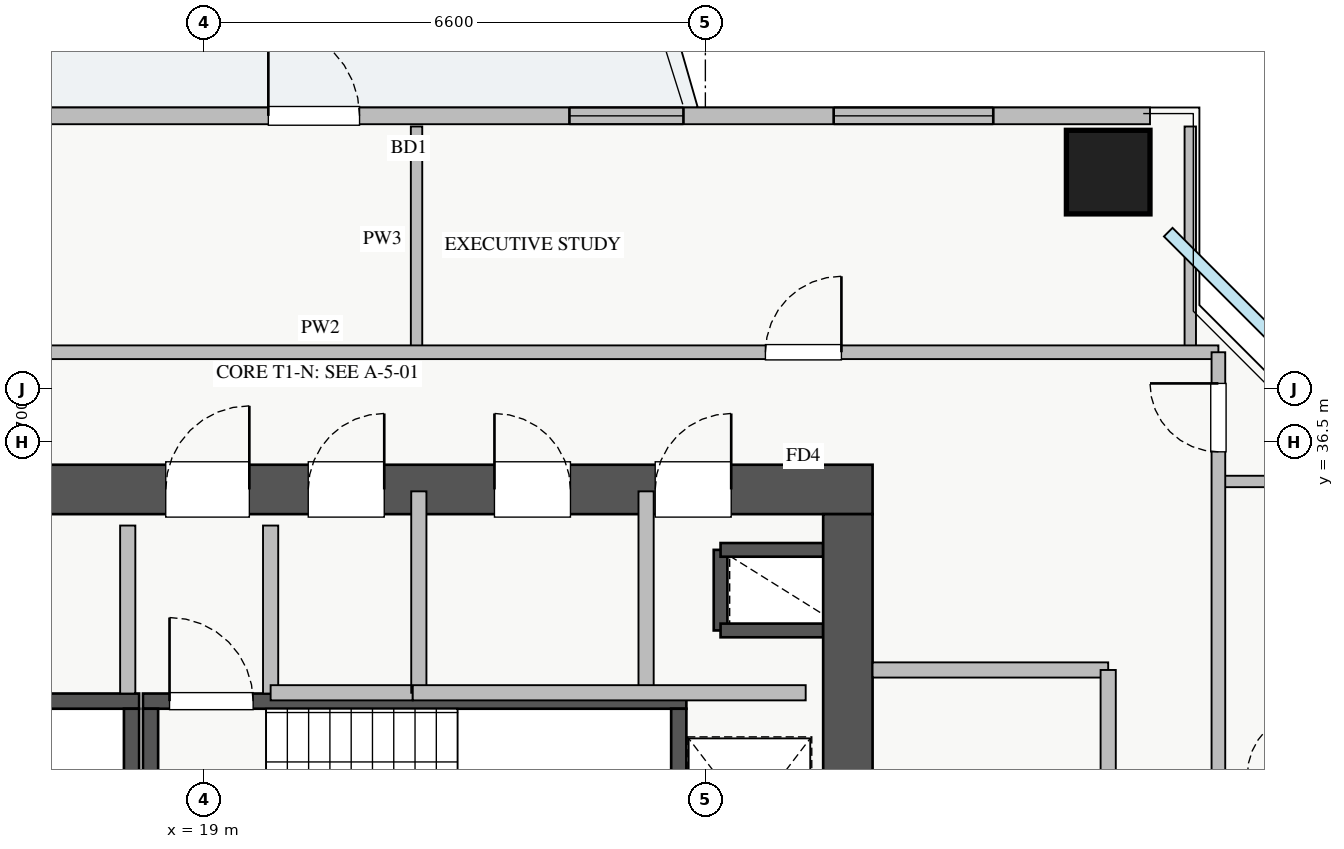
"""IFC4 building model, lengths in metres.
Left out: names, types, materials, properties, quantities, classifications, styles, units other than length and angle.
Written with IfcOpenShell. Run it as: python <this file> out.ifc"""

import sys

from ifc_helpers import new_model, si_unit, direction, frame, frame_2d, origin, origin_2d, place, context, subcontext, project, spatial, rectangle, extrude, source, transform, mapped, element, fill, save


model = new_model("IFC4")
c1 = context("Model", 3, precision=1e-05, world=origin(), true_north=direction((0.0, 1.0)))
c2 = subcontext(c1, "Body", "Model", "MODEL_VIEW")
j1 = project(units=[si_unit("LENGTHUNIT", "METRE"), si_unit("PLANEANGLEUNIT", "RADIAN")], contexts=[c1])
p1 = place(None, origin())
s1 = spatial("IfcSite", under=j1, at=p1, CompositionType="ELEMENT")
p2 = place(p1, origin())
s2 = spatial("IfcBuilding", under=s1, at=p2, CompositionType="ELEMENT")
p3 = place(p2, frame((0.0, 0.0, 126.25)))
s3 = spatial("IfcBuildingStorey", under=s2, at=p3, CompositionType="ELEMENT", Elevation=126.25)
p4 = place(p3, frame((25.8, 34.02, 0.0), z_axis=(0.0, 0.0, 1.0), x_axis=(0.0, 1.0, 0.0)))
e1 = element("IfcWall", 1, at=p4, inside=s3, PredefinedType="SHEAR", context=c2, shape_type="SweptSolid", body=[
    extrude(rectangle(XDim=1.06, YDim=0.18, at=frame_2d((0.53, 0.0))), origin(), (0.0, 0.0, 1.0), 3.07),
])
for number, where, z_axis, x_axis in (
    (2, (25.8, 35.08, 0.0), (0.0, 0.0, 1.0), (1.0, 0.0, 0.0)),
    (3, (25.8, 34.02, 0.0), (0.0, 0.0, 1.0), (1.0, 0.0, 0.0)),
):
    element("IfcWall", number, at=place(p3, frame(where, z_axis=z_axis, x_axis=x_axis)), inside=s3, PredefinedType="SHEAR", context=c2, shape_type="SweptSolid", body=[
        extrude(rectangle(XDim=1.35, YDim=0.18, at=frame_2d((0.675, 0.0))), origin(), (0.0, 0.0, 1.0), 3.07),
    ])
p5 = place(p3, frame((10.85, 33.09, 0.0), z_axis=(0.0, 0.0, 1.0), x_axis=(1.0, 0.0, 0.0)))
e4 = element("IfcWall", 4, at=p5, inside=s3, PredefinedType="SHEAR", context=c2, shape_type="SweptSolid", body=[
    extrude(rectangle(XDim=7.3, YDim=0.2, at=frame_2d((3.65, 0.0))), origin(), (0.0, 0.0, 1.0), 3.25),
])
p6 = place(p5, frame((0.35, 0.0, 0.0)))
e5 = element("IfcOpeningElement", 5, at=p6, cuts=e4, PredefinedType="OPENING", context=c2, shape_type="SweptSolid", body=[
    extrude(rectangle(XDim=1.1, YDim=2.05, at=frame_2d((0.55, 1.025))), frame((0.0, 0.11, 0.0), z_axis=(0.0, -1.0, 0.0), x_axis=(1.0, 0.0, 0.0)), (0.0, 0.0, 1.0), 0.22),
])
p7 = place(p3, frame((18.05, 30.05, 0.0), z_axis=(0.0, 0.0, 1.0), x_axis=(0.0, 1.0, 0.0)))
e6 = element("IfcWall", 6, at=p7, inside=s3, PredefinedType="SHEAR", context=c2, shape_type="SweptSolid", body=[
    extrude(rectangle(XDim=2.94, YDim=0.2, at=frame_2d((1.47, 0.0))), origin(), (0.0, 0.0, 1.0), 3.25),
])
p8 = place(p3, frame((18.2, 33.09, 0.0), z_axis=(0.0, 0.0, 1.0), x_axis=(1.0, 0.0, 0.0)))
e7 = element("IfcWall", 7, at=p8, inside=s3, PredefinedType="SHEAR", context=c2, shape_type="SweptSolid", body=[
    extrude(rectangle(XDim=7.15, YDim=0.2, at=frame_2d((3.575, 0.0))), origin(), (0.0, 0.0, 1.0), 3.25),
])
p9 = place(p8, frame((0.35, 0.0, 0.0)))
e8 = element("IfcOpeningElement", 8, at=p9, cuts=e7, PredefinedType="OPENING", context=c2, shape_type="SweptSolid", body=[
    extrude(rectangle(XDim=1.1, YDim=2.05, at=frame_2d((0.55, 1.025))), frame((0.0, 0.11, 0.0), z_axis=(0.0, -1.0, 0.0), x_axis=(1.0, 0.0, 0.0)), (0.0, 0.0, 1.0), 0.22),
])
for number, where, z_axis, x_axis in (
    (9, (18.3, 30.05, 0.0), (0.0, 0.0, 1.0), (0.0, 1.0, 0.0)),
    (10, (25.25, 30.05, 0.0), (0.0, 0.0, 1.0), (0.0, 1.0, 0.0)),
):
    element("IfcWall", number, at=place(p3, frame(where, z_axis=z_axis, x_axis=x_axis)), inside=s3, PredefinedType="SHEAR", context=c2, shape_type="SweptSolid", body=[
        extrude(rectangle(XDim=2.94, YDim=0.2, at=frame_2d((1.47, 0.0))), origin(), (0.0, 0.0, 1.0), 3.25),
    ])
p10 = place(p3, frame((10.2, 35.875, 0.0), z_axis=(0.0, 0.0, 1.0), x_axis=(1.0, 0.0, 0.0)))
e11 = element("IfcWall", 11, at=p10, inside=s3, PredefinedType="SHEAR", context=c2, shape_type="SweptSolid", body=[
    extrude(rectangle(XDim=17.6, YDim=0.65, at=frame_2d((8.8, 0.0))), origin(), (0.0, 0.0, 1.0), 3.25),
])
p11 = place(p10, frame((1.15, 0.0, 0.0)))
e12 = element("IfcOpeningElement", 12, at=p11, cuts=e11, PredefinedType="OPENING", context=c2, shape_type="SweptSolid", body=[
    extrude(rectangle(XDim=1.1, YDim=2.05, at=frame_2d((0.55, 1.025))), frame((0.0, 0.335, 0.0), z_axis=(0.0, -1.0, 0.0), x_axis=(1.0, 0.0, 0.0)), (0.0, 0.0, 1.0), 0.67),
])
p12 = place(p10, frame((8.3, 0.0, 0.0)))
e13 = element("IfcOpeningElement", 13, at=p12, cuts=e11, PredefinedType="OPENING", context=c2, shape_type="SweptSolid", body=[
    extrude(rectangle(XDim=1.1, YDim=2.05, at=frame_2d((0.55, 1.025))), frame((0.0, 0.335, 0.0), z_axis=(0.0, -1.0, 0.0), x_axis=(1.0, 0.0, 0.0)), (0.0, 0.0, 1.0), 0.67),
])
p13 = place(p10, frame((4.9, 0.0, 0.0)))
e14 = element("IfcOpeningElement", 14, at=p13, cuts=e11, PredefinedType="OPENING", context=c2, shape_type="SweptSolid", body=[
    extrude(rectangle(XDim=1.1, YDim=2.05, at=frame_2d((0.55, 1.025))), frame((0.0, 0.335, 0.0), z_axis=(0.0, -1.0, 0.0), x_axis=(1.0, 0.0, 0.0)), (0.0, 0.0, 1.0), 0.67),
])
p14 = place(p10, frame((14.74, 0.0, 0.0)))
e15 = element("IfcOpeningElement", 15, at=p14, cuts=e11, PredefinedType="OPENING", context=c2, shape_type="SweptSolid", body=[
    extrude(rectangle(XDim=1.0, YDim=2.05, at=frame_2d((0.5, 1.025))), frame((0.0, 0.335, 0.0), z_axis=(0.0, -1.0, 0.0), x_axis=(1.0, 0.0, 0.0)), (0.0, 0.0, 1.0), 0.67),
])
p15 = place(p10, frame((10.175, 0.0, 0.0)))
e16 = element("IfcOpeningElement", 16, at=p15, cuts=e11, PredefinedType="OPENING", context=c2, shape_type="SweptSolid", body=[
    extrude(rectangle(XDim=1.0, YDim=2.05, at=frame_2d((0.5, 1.025))), frame((0.0, 0.335, 0.0), z_axis=(0.0, -1.0, 0.0), x_axis=(1.0, 0.0, 0.0)), (0.0, 0.0, 1.0), 0.67),
])
p16 = place(p10, frame((12.625, 0.0, 0.0)))
e17 = element("IfcOpeningElement", 17, at=p16, cuts=e11, PredefinedType="OPENING", context=c2, shape_type="SweptSolid", body=[
    extrude(rectangle(XDim=1.0, YDim=2.05, at=frame_2d((0.5, 1.025))), frame((0.0, 0.335, 0.0), z_axis=(0.0, -1.0, 0.0), x_axis=(1.0, 0.0, 0.0)), (0.0, 0.0, 1.0), 0.67),
])
p17 = place(p3, frame((27.475, 29.65, 0.0), z_axis=(0.0, 0.0, 1.0), x_axis=(0.0, 1.0, 0.0)))
e18 = element("IfcWall", 18, at=p17, inside=s3, PredefinedType="SHEAR", context=c2, shape_type="SweptSolid", body=[
    extrude(rectangle(XDim=5.9, YDim=0.65, at=frame_2d((2.95, 0.0))), origin(), (0.0, 0.0, 1.0), 3.25),
])
p18 = place(p17, frame((1.1, 0.0, 0.0)))
e19 = element("IfcOpeningElement", 19, at=p18, cuts=e18, PredefinedType="OPENING", context=c2, shape_type="SweptSolid", body=[
    extrude(rectangle(XDim=1.3, YDim=2.05, at=frame_2d((0.65, 1.025))), frame((0.0, 0.335, 0.0), z_axis=(0.0, -1.0, 0.0), x_axis=(1.0, 0.0, 0.0)), (0.0, 0.0, 1.0), 0.67),
])
m1 = source(origin(), c2, "Body", "SweptSolid", [
    extrude(rectangle(XDim=1.1, YDim=1.1, at=origin_2d()), origin(), (0.0, 0.0, 1.0), 3.25),
])
p19 = place(p3, frame((30.9, 40.05, 0.0), z_axis=(0.0, 0.0, 1.0), x_axis=(1.0, 0.0, 0.0)))
e20 = element("IfcColumn", 20, at=p19, inside=s3, PredefinedType="COLUMN", context=c2, shape_type="MappedRepresentation", body=[
    mapped(m1, transform((0.0, 0.0, 0.0), x_axis=(1.0, 0.0, 0.0), y_axis=(0.0, 1.0, 0.0), z_axis=(0.0, 0.0, 1.0), scale=1.0)),
])
p20 = place(p3, frame((6.55, 40.79, 0.0), z_axis=(0.0, 0.0, 1.0), x_axis=(1.0, 0.0, 0.0)))
e21 = element("IfcWall", 21, at=p20, inside=s3, PredefinedType="STANDARD", context=c2, shape_type="SweptSolid", body=[
    extrude(rectangle(XDim=24.9, YDim=0.22, at=frame_2d((12.45, 0.0))), origin(), (0.0, 0.0, 1.0), 2.61),
])
p21 = place(p20, frame((13.3, 0.0, 0.0)))
e22 = element("IfcOpeningElement", 22, at=p21, cuts=e21, PredefinedType="OPENING", context=c2, shape_type="SweptSolid", body=[
    extrude(rectangle(XDim=1.2, YDim=2.1, at=frame_2d((0.6, 1.05))), frame((0.0, 0.12, 0.0), z_axis=(0.0, -1.0, 0.0), x_axis=(1.0, 0.0, 0.0)), (0.0, 0.0, 1.0), 0.24),
])
p22 = place(p20, frame((0.343, 0.0, 0.9)))
e23 = element("IfcOpeningElement", 23, at=p22, cuts=e21, PredefinedType="OPENING", context=c2, shape_type="SweptSolid", body=[
    extrude(rectangle(XDim=1.5, YDim=1.5, at=frame_2d((0.75, 0.75))), frame((0.0, 0.12, 0.0), z_axis=(0.0, -1.0, 0.0), x_axis=(1.0, 0.0, 0.0)), (0.0, 0.0, 1.0), 0.24),
])
p23 = place(p20, frame((8.438, 0.0, 0.9)))
e24 = element("IfcOpeningElement", 24, at=p23, cuts=e21, PredefinedType="OPENING", context=c2, shape_type="SweptSolid", body=[
    extrude(rectangle(XDim=1.8, YDim=1.45, at=frame_2d((0.9, 0.725))), frame((0.0, 0.12, 0.0), z_axis=(0.0, -1.0, 0.0), x_axis=(1.0, 0.0, 0.0)), (0.0, 0.0, 1.0), 0.24),
])
p24 = place(p20, frame((17.261, 0.0, 0.9)))
e25 = element("IfcOpeningElement", 25, at=p24, cuts=e21, PredefinedType="OPENING", context=c2, shape_type="SweptSolid", body=[
    extrude(rectangle(XDim=1.5, YDim=1.5, at=frame_2d((0.75, 0.75))), frame((0.0, 0.12, 0.0), z_axis=(0.0, -1.0, 0.0), x_axis=(1.0, 0.0, 0.0)), (0.0, 0.0, 1.0), 0.24),
])
p25 = place(p20, frame((20.738, 0.0, 0.9)))
e26 = element("IfcOpeningElement", 26, at=p25, cuts=e21, PredefinedType="OPENING", context=c2, shape_type="SweptSolid", body=[
    extrude(rectangle(XDim=2.1, YDim=1.48, at=frame_2d((1.05, 0.74))), frame((0.0, 0.12, 0.0), z_axis=(0.0, -1.0, 0.0), x_axis=(1.0, 0.0, 0.0)), (0.0, 0.0, 1.0), 0.24),
])
p26 = place(p20, frame((4.122, 0.0, 0.9)))
e27 = element("IfcOpeningElement", 27, at=p26, cuts=e21, PredefinedType="OPENING", context=c2, shape_type="SweptSolid", body=[
    extrude(rectangle(XDim=2.4, YDim=1.5, at=frame_2d((1.2, 0.75))), frame((0.0, 0.12, 0.0), z_axis=(0.0, -1.0, 0.0), x_axis=(1.0, 0.0, 0.0)), (0.0, 0.0, 1.0), 0.24),
])
p27 = place(p3, frame((27.8, 33.5, 0.0), z_axis=(0.0, 0.0, 1.0), x_axis=(1.0, 0.0, 0.0)))
e28 = element("IfcWall", 28, at=p27, inside=s3, PredefinedType="PARTITIONING", context=c2, shape_type="SweptSolid", body=[
    extrude(rectangle(XDim=3.1, YDim=0.2, at=frame_2d((1.55, 0.0))), origin(), (0.0, 0.0, 1.0), 3.07),
])
p28 = place(p3, frame((30.9, 29.6, 0.0), z_axis=(0.0, 0.0, 1.0), x_axis=(0.0, 1.0, 0.0)))
e29 = element("IfcWall", 29, at=p28, inside=s3, PredefinedType="PARTITIONING", context=c2, shape_type="SweptSolid", body=[
    extrude(rectangle(XDim=3.9, YDim=0.2, at=frame_2d((1.95, 0.0))), origin(), (0.0, 0.0, 1.0), 3.07),
])
p29 = place(p28, frame((1.4, 0.0, 0.0)))
e30 = element("IfcOpeningElement", 30, at=p29, cuts=e29, PredefinedType="OPENING", context=c2, shape_type="SweptSolid", body=[
    extrude(rectangle(XDim=1.1, YDim=2.05, at=frame_2d((0.55, 1.025))), frame((0.0, 0.11, 0.0), z_axis=(0.0, -1.0, 0.0), x_axis=(1.0, 0.0, 0.0)), (0.0, 0.0, 1.0), 0.22),
])
for number, where, z_axis, x_axis in (
    (31, (18.0, 33.19, 0.0), (0.0, 0.0, 1.0), (0.0, 1.0, 0.0)),
    (32, (19.88, 33.19, 0.0), (0.0, 0.0, 1.0), (0.0, 1.0, 0.0)),
):
    element("IfcWall", number, at=place(p3, frame(where, z_axis=z_axis, x_axis=x_axis)), inside=s3, PredefinedType="PARTITIONING", context=c2, shape_type="SweptSolid", body=[
        extrude(rectangle(XDim=2.21, YDim=0.2, at=frame_2d((1.105, 0.0))), origin(), (0.0, 0.0, 1.0), 3.07),
    ])
p30 = place(p3, frame((24.82, 33.2, 0.0), z_axis=(0.0, 0.0, 1.0), x_axis=(0.0, 1.0, 0.0)))
e33 = element("IfcWall", 33, at=p30, inside=s3, PredefinedType="PARTITIONING", context=c2, shape_type="SweptSolid", body=[
    extrude(rectangle(XDim=2.65, YDim=0.2, at=frame_2d((1.325, 0.0))), origin(), (0.0, 0.0, 1.0), 3.07),
])
p31 = place(p3, frame((19.88, 33.2, 0.0), z_axis=(0.0, 0.0, 1.0), x_axis=(1.0, 0.0, 0.0)))
e34 = element("IfcWall", 34, at=p31, inside=s3, PredefinedType="PARTITIONING", context=c2, shape_type="SweptSolid", body=[
    extrude(rectangle(XDim=1.87, YDim=0.2, at=frame_2d((0.935, 0.0))), origin(), (0.0, 0.0, 1.0), 3.07),
])
p32 = place(p3, frame((21.83, 33.2, 0.0), z_axis=(0.0, 0.0, 1.0), x_axis=(0.0, 1.0, 0.0)))
e35 = element("IfcWall", 35, at=p32, inside=s3, PredefinedType="PARTITIONING", context=c2, shape_type="SweptSolid", body=[
    extrude(rectangle(XDim=2.65, YDim=0.2, at=frame_2d((1.325, 0.0))), origin(), (0.0, 0.0, 1.0), 3.07),
])
p33 = place(p3, frame((21.75, 33.2, 0.0), z_axis=(0.0, 0.0, 1.0), x_axis=(1.0, 0.0, 0.0)))
e36 = element("IfcWall", 36, at=p33, inside=s3, PredefinedType="PARTITIONING", context=c2, shape_type="SweptSolid", body=[
    extrude(rectangle(XDim=5.17, YDim=0.2, at=frame_2d((2.585, 0.0))), origin(), (0.0, 0.0, 1.0), 3.07),
])
for number, where, z_axis, x_axis in (
    (37, (21.8, 37.68, 0.0), (0.0, 0.0, 1.0), (0.0, 1.0, 0.0)),
    (38, (31.98, 37.68, 0.0), (0.0, 0.0, 1.0), (0.0, 1.0, 0.0)),
):
    element("IfcWall", number, at=place(p3, frame(where, z_axis=z_axis, x_axis=x_axis)), inside=s3, PredefinedType="PARTITIONING", context=c2, shape_type="SweptSolid", body=[
        extrude(rectangle(XDim=2.97, YDim=0.15, at=frame_2d((1.485, 0.0))), origin(), (0.0, 0.0, 1.0), 3.07),
    ])
p34 = place(p3, frame((8.72, 37.68, 0.0), z_axis=(0.0, 0.0, 1.0), x_axis=(1.0, 0.0, 0.0)))
e39 = element("IfcWall", 39, at=p34, inside=s3, PredefinedType="PARTITIONING", context=c2, shape_type="SweptSolid", body=[
    extrude(rectangle(XDim=23.63, YDim=0.18, at=frame_2d((11.815, 0.0))), origin(), (0.0, 0.0, 1.0), 3.07),
])
p35 = place(p34, frame((6.04, 0.0, 0.0)))
e40 = element("IfcOpeningElement", 40, at=p35, cuts=e39, PredefinedType="OPENING", context=c2, shape_type="SweptSolid", body=[
    extrude(rectangle(XDim=1.0, YDim=2.05, at=frame_2d((0.5, 1.025))), frame((0.0, 0.1, 0.0), z_axis=(0.0, -1.0, 0.0), x_axis=(1.0, 0.0, 0.0)), (0.0, 0.0, 1.0), 0.2),
])
p36 = place(p34, frame((17.67, 0.0, 0.0)))
e41 = element("IfcOpeningElement", 41, at=p36, cuts=e39, PredefinedType="OPENING", context=c2, shape_type="SweptSolid", body=[
    extrude(rectangle(XDim=1.0, YDim=2.05, at=frame_2d((0.5, 1.025))), frame((0.0, 0.1, 0.0), z_axis=(0.0, -1.0, 0.0), x_axis=(1.0, 0.0, 0.0)), (0.0, 0.0, 1.0), 0.2),
])
p37 = place(p3, frame((32.35, 35.98, 0.0), z_axis=(0.0, 0.0, 1.0), x_axis=(1.0, 0.0, 0.0)))
e42 = element("IfcWall", 42, at=p37, inside=s3, PredefinedType="PARTITIONING", context=c2, shape_type="SweptSolid", body=[
    extrude(rectangle(XDim=4.3, YDim=0.15, at=frame_2d((2.15, 0.0))), origin(), (0.0, 0.0, 1.0), 3.07),
])
p38 = place(p3, frame((32.35, 8.31, 0.0), z_axis=(0.0, 0.0, 1.0), x_axis=(0.0, 1.0, 0.0)))
e43 = element("IfcWall", 43, at=p38, inside=s3, PredefinedType="PARTITIONING", context=c2, shape_type="SweptSolid", body=[
    extrude(rectangle(XDim=29.37, YDim=0.18, at=frame_2d((14.685, 0.0))), origin(), (0.0, 0.0, 1.0), 3.07),
])
p39 = place(p38, frame((28.06, 0.0, 0.0)))
e44 = element("IfcOpeningElement", 44, at=p39, cuts=e43, PredefinedType="OPENING", context=c2, shape_type="SweptSolid", body=[
    extrude(rectangle(XDim=0.9, YDim=2.05, at=frame_2d((0.45, 1.025))), frame((0.0, 0.1, 0.0), z_axis=(0.0, -1.0, 0.0), x_axis=(1.0, 0.0, 0.0)), (0.0, 0.0, 1.0), 0.2),
])
p40 = place(p38, frame((0.415, 0.0, 0.0)))
e45 = element("IfcOpeningElement", 45, at=p40, cuts=e43, PredefinedType="OPENING", context=c2, shape_type="SweptSolid", body=[
    extrude(rectangle(XDim=0.9, YDim=2.05, at=frame_2d((0.45, 1.025))), frame((0.0, 0.1, 0.0), z_axis=(0.0, -1.0, 0.0), x_axis=(1.0, 0.0, 0.0)), (0.0, 0.0, 1.0), 0.2),
])
p41 = place(p38, frame((5.295, 0.0, 0.0)))
e46 = element("IfcOpeningElement", 46, at=p41, cuts=e43, PredefinedType="OPENING", context=c2, shape_type="SweptSolid", body=[
    extrude(rectangle(XDim=1.0, YDim=2.05, at=frame_2d((0.5, 1.025))), frame((0.0, 0.1, 0.0), z_axis=(0.0, -1.0, 0.0), x_axis=(1.0, 0.0, 0.0)), (0.0, 0.0, 1.0), 0.2),
])
p42 = place(p38, frame((11.645, 0.0, 0.0)))
e47 = element("IfcOpeningElement", 47, at=p42, cuts=e43, PredefinedType="OPENING", context=c2, shape_type="SweptSolid", body=[
    extrude(rectangle(XDim=1.0, YDim=2.05, at=frame_2d((0.5, 1.025))), frame((0.0, 0.1, 0.0), z_axis=(0.0, -1.0, 0.0), x_axis=(1.0, 0.0, 0.0)), (0.0, 0.0, 1.0), 0.2),
])
p43 = place(p38, frame((20.835, 0.0, 0.0)))
e48 = element("IfcOpeningElement", 48, at=p43, cuts=e43, PredefinedType="OPENING", context=c2, shape_type="SweptSolid", body=[
    extrude(rectangle(XDim=1.0, YDim=2.05, at=frame_2d((0.5, 1.025))), frame((0.0, 0.1, 0.0), z_axis=(0.0, -1.0, 0.0), x_axis=(1.0, 0.0, 0.0)), (0.0, 0.0, 1.0), 0.2),
])
m2 = source(origin(), c2, "Body", "SweptSolid", [
    extrude(rectangle(XDim=1.2, YDim=2.1, at=frame_2d((0.6, 1.05))), frame((0.0, 0.025, 0.0), z_axis=(0.0, -1.0, 0.0), x_axis=(1.0, 0.0, 0.0)), (0.0, 0.0, 1.0), 0.05),
])
p44 = place(p21, origin())
e49 = element("IfcDoor", 49, at=p44, inside=s3, OperationType="SINGLE_SWING_LEFT", PredefinedType="DOOR", context=c2, shape_type="MappedRepresentation", body=[
    mapped(m2, transform((0.0, 0.0, 0.0), x_axis=(1.0, 0.0, 0.0), y_axis=(0.0, 1.0, 0.0), z_axis=(0.0, 0.0, 1.0), scale=1.0)),
])
fill(e22, e49)
m3 = source(origin(), c2, "Body", "SweptSolid", [
    extrude(rectangle(XDim=1.5, YDim=1.5, at=frame_2d((0.75, 0.75))), frame((0.0, 0.03, 0.0), z_axis=(0.0, -1.0, 0.0), x_axis=(1.0, 0.0, 0.0)), (0.0, 0.0, 1.0), 0.06),
])
p45 = place(p24, origin())
e50 = element("IfcWindow", 50, at=p45, inside=s3, PartitioningType="DOUBLE_PANEL_VERTICAL", PredefinedType="WINDOW", context=c2, shape_type="MappedRepresentation", body=[
    mapped(m3, transform((0.0, 0.0, 0.0), x_axis=(1.0, 0.0, 0.0), y_axis=(0.0, 1.0, 0.0), z_axis=(0.0, 0.0, 1.0), scale=1.0)),
])
fill(e25, e50)
m4 = source(origin(), c2, "Body", "SweptSolid", [
    extrude(rectangle(XDim=2.1, YDim=1.48, at=frame_2d((1.05, 0.74))), frame((0.0, 0.03, 0.0), z_axis=(0.0, -1.0, 0.0), x_axis=(1.0, 0.0, 0.0)), (0.0, 0.0, 1.0), 0.06),
])
p46 = place(p25, origin())
e51 = element("IfcWindow", 51, at=p46, inside=s3, PartitioningType="TRIPLE_PANEL_VERTICAL", PredefinedType="WINDOW", context=c2, shape_type="MappedRepresentation", body=[
    mapped(m4, transform((0.0, 0.0, 0.0), x_axis=(1.0, 0.0, 0.0), y_axis=(0.0, 1.0, 0.0), z_axis=(0.0, 0.0, 1.0), scale=1.0)),
])
fill(e26, e51)
m5 = source(origin(), c2, "Body", "SweptSolid", [
    extrude(rectangle(XDim=1.1, YDim=2.05, at=frame_2d((0.55, 1.025))), frame((0.0, 0.025, 0.0), z_axis=(0.0, -1.0, 0.0), x_axis=(1.0, 0.0, 0.0)), (0.0, 0.0, 1.0), 0.05),
])
p47 = place(p12, origin())
e52 = element("IfcDoor", 52, at=p47, inside=s3, OperationType="SINGLE_SWING_RIGHT", PredefinedType="DOOR", context=c2, shape_type="MappedRepresentation", body=[
    mapped(m5, transform((0.0, 0.0, 0.0), x_axis=(1.0, 0.0, 0.0), y_axis=(0.0, 1.0, 0.0), z_axis=(0.0, 0.0, 1.0), scale=1.0)),
])
fill(e13, e52)
p48 = place(p9, origin())
e53 = element("IfcDoor", 53, at=p48, inside=s3, OperationType="SINGLE_SWING_LEFT", PredefinedType="DOOR", context=c2, shape_type="MappedRepresentation", body=[
    mapped(m5, transform((0.0, 0.0, 0.0), x_axis=(1.0, 0.0, 0.0), y_axis=(0.0, 1.0, 0.0), z_axis=(0.0, 0.0, 1.0), scale=1.0)),
])
fill(e8, e53)
m6 = source(origin(), c2, "Body", "SweptSolid", [
    extrude(rectangle(XDim=1.0, YDim=2.05, at=frame_2d((0.5, 1.025))), frame((0.0, 0.025, 0.0), z_axis=(0.0, -1.0, 0.0), x_axis=(1.0, 0.0, 0.0)), (0.0, 0.0, 1.0), 0.05),
])
p49 = place(p14, origin())
e54 = element("IfcDoor", 54, at=p49, inside=s3, OperationType="SINGLE_SWING_RIGHT", PredefinedType="DOOR", context=c2, shape_type="MappedRepresentation", body=[
    mapped(m6, transform((0.0, 0.0, 0.0), x_axis=(1.0, 0.0, 0.0), y_axis=(0.0, 1.0, 0.0), z_axis=(0.0, 0.0, 1.0), scale=1.0)),
])
fill(e15, e54)
p50 = place(p15, origin())
e55 = element("IfcDoor", 55, at=p50, inside=s3, OperationType="SINGLE_SWING_RIGHT", PredefinedType="DOOR", context=c2, shape_type="MappedRepresentation", body=[
    mapped(m6, transform((0.0, 0.0, 0.0), x_axis=(1.0, 0.0, 0.0), y_axis=(0.0, 1.0, 0.0), z_axis=(0.0, 0.0, 1.0), scale=1.0)),
])
fill(e16, e55)
p51 = place(p16, origin())
e56 = element("IfcDoor", 56, at=p51, inside=s3, OperationType="SINGLE_SWING_LEFT", PredefinedType="DOOR", context=c2, shape_type="MappedRepresentation", body=[
    mapped(m6, transform((0.0, 0.0, 0.0), x_axis=(1.0, 0.0, 0.0), y_axis=(0.0, 1.0, 0.0), z_axis=(0.0, 0.0, 1.0), scale=1.0)),
])
fill(e17, e56)
p52 = place(p36, origin())
e57 = element("IfcDoor", 57, at=p52, inside=s3, OperationType="SINGLE_SWING_RIGHT", PredefinedType="DOOR", context=c2, shape_type="MappedRepresentation", body=[
    mapped(m6, transform((0.0, 0.0, 0.0), x_axis=(1.0, 0.0, 0.0), y_axis=(0.0, 1.0, 0.0), z_axis=(0.0, 0.0, 1.0), scale=1.0)),
])
fill(e41, e57)
m7 = source(origin(), c2, "Body", "SweptSolid", [
    extrude(rectangle(XDim=0.9, YDim=2.05, at=frame_2d((0.45, 1.025))), frame((0.0, 0.025, 0.0), z_axis=(0.0, -1.0, 0.0), x_axis=(1.0, 0.0, 0.0)), (0.0, 0.0, 1.0), 0.05),
])
p53 = place(p39, origin())
e58 = element("IfcDoor", 58, at=p53, inside=s3, OperationType="SINGLE_SWING_RIGHT", PredefinedType="DOOR", context=c2, shape_type="MappedRepresentation", body=[
    mapped(m7, transform((0.0, 0.0, 0.0), x_axis=(1.0, 0.0, 0.0), y_axis=(0.0, 1.0, 0.0), z_axis=(0.0, 0.0, 1.0), scale=1.0)),
])
fill(e44, e58)
save(model, sys.argv[1])
